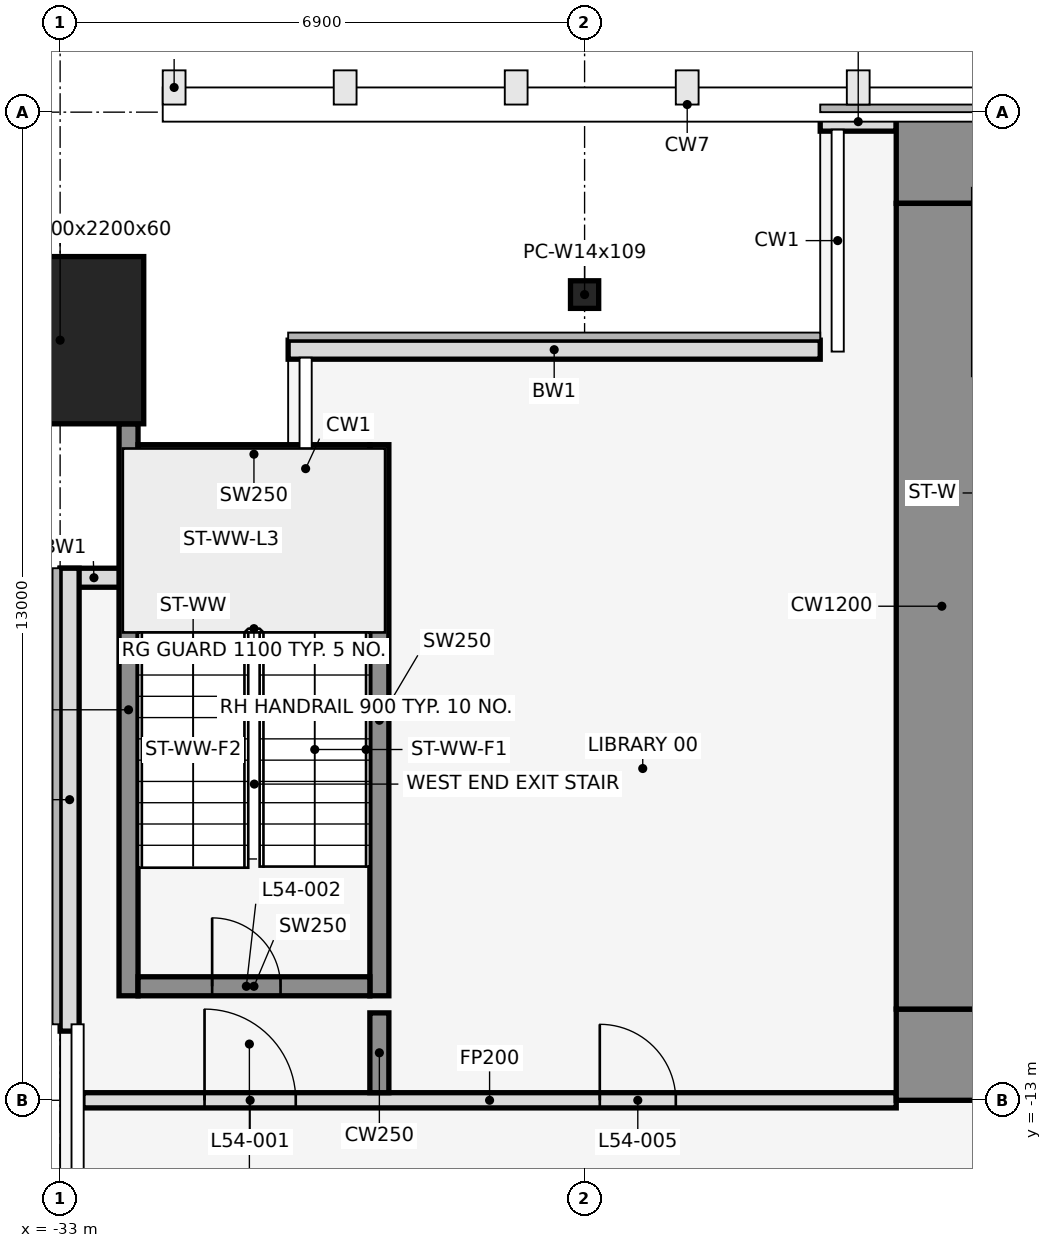
"""IFC4 building model, lengths in metres.
Left out: names, types, materials, properties, quantities, classifications, styles, units other than length and angle.
Written with IfcOpenShell. Run it as: python <this file> out.ifc"""

import sys

from ifc_helpers import new_model, si_unit, direction, frame, frame_2d, origin, origin_2d, place, context, subcontext, project, spatial, rectangle, hollow_rectangle, i_section, extrude, element, fill, save


model = new_model("IFC4")
c1 = context("Model", 3, precision=1e-05, world=origin(), true_north=direction((0.0, 1.0)))
c2 = subcontext(c1, "Body", "Model", "MODEL_VIEW")
j1 = project(units=[si_unit("LENGTHUNIT", "METRE"), si_unit("PLANEANGLEUNIT", "RADIAN")], contexts=[c1])
p1 = place(None, origin())
s1 = spatial("IfcSite", under=j1, at=p1, CompositionType="ELEMENT")
p2 = place(p1, origin())
s2 = spatial("IfcBuilding", under=s1, at=p2, CompositionType="ELEMENT")
p3 = place(p2, frame((0.0, 0.0, 241.4)))
s3 = spatial("IfcBuildingStorey", under=s2, at=p3, CompositionType="ELEMENT", Elevation=241.4)
p4 = place(p3, frame((-33.0, -3.0, 0.0), z_axis=(0.0, 0.0, 1.0), x_axis=(1.0, 0.0, 0.0)))
e1 = element("IfcColumn", 1, at=p4, inside=s3, PredefinedType="COLUMN", context=c2, shape_type="SweptSolid", body=[
    extrude(hollow_rectangle(XDim=2.2, YDim=2.2, WallThickness=0.06, at=origin_2d()), origin(), (0.0, 0.0, 1.0), 4.2),
])
p5 = place(p3, frame((-26.1, -2.4, 0.0), z_axis=(0.0, 0.0, 1.0), x_axis=(1.0, 0.0, 0.0)))
e2 = element("IfcColumn", 2, at=p5, inside=s3, PredefinedType="COLUMN", context=c2, shape_type="SweptSolid", body=[
    extrude(i_section(OverallWidth=0.371, OverallDepth=0.363, WebThickness=0.013, FlangeThickness=0.022, at=origin_2d()), origin(), (0.0, 0.0, 1.0), 4.2),
])
p6 = place(p3, frame((-22.0, -0.125, 0.0), z_axis=(0.0, 0.0, 1.0), x_axis=(-1.0, 0.0, 0.0)))
e3 = element("IfcWall", 3, at=p6, inside=s3, PredefinedType="STANDARD", context=c2, shape_type="SweptSolid", body=[
    extrude(rectangle(XDim=1.0, YDim=0.25, at=frame_2d((0.5, 0.0))), origin(), (0.0, 0.0, 1.0), 4.05),
])
p7 = place(p3, frame((-23.0, -3.125, 0.0), z_axis=(0.0, 0.0, 1.0), x_axis=(-1.0, 0.0, 0.0)))
e4 = element("IfcWall", 4, at=p7, inside=s3, PredefinedType="STANDARD", context=c2, shape_type="SweptSolid", body=[
    extrude(rectangle(XDim=7.0, YDim=0.25, at=frame_2d((3.5, 0.0))), origin(), (0.0, 0.0, 1.0), 4.05),
])
p8 = place(p3, frame((-32.11, -6.125, 0.0), z_axis=(0.0, 0.0, 1.0), x_axis=(-1.0, 0.0, 0.0)))
e5 = element("IfcWall", 5, at=p8, inside=s3, PredefinedType="STANDARD", context=c2, shape_type="SweptSolid", body=[
    extrude(rectangle(XDim=0.89, YDim=0.25, at=frame_2d((0.445, 0.0))), origin(), (0.0, 0.0, 1.0), 4.05),
])
p9 = place(p3, frame((-32.875, -6.0, 0.0), z_axis=(0.0, 0.0, 1.0), x_axis=(0.0, -1.0, 0.0)))
e6 = element("IfcWall", 6, at=p9, inside=s3, PredefinedType="STANDARD", context=c2, shape_type="SweptSolid", body=[
    extrude(rectangle(XDim=6.09, YDim=0.25, at=frame_2d((3.045, 0.0))), origin(), (0.0, 0.0, 1.0), 4.05),
])
p10 = place(p3, frame((-32.1, -11.625, 0.0), z_axis=(0.0, 0.0, 1.0), x_axis=(0.0, 1.0, 0.0)))
e7 = element("IfcWall", 7, at=p10, inside=s3, PredefinedType="SHEAR", context=c2, shape_type="SweptSolid", body=[
    extrude(rectangle(XDim=7.525, YDim=0.25, at=frame_2d((3.762, 0.0))), origin(), (0.0, 0.0, 1.0), 4.2),
])
p11 = place(p3, frame((-28.8, -11.625, 0.0), z_axis=(0.0, 0.0, 1.0), x_axis=(0.0, 1.0, 0.0)))
e8 = element("IfcWall", 8, at=p11, inside=s3, PredefinedType="SHEAR", context=c2, shape_type="SweptSolid", body=[
    extrude(rectangle(XDim=7.25, YDim=0.25, at=frame_2d((3.625, 0.0))), origin(), (0.0, 0.0, 1.0), 4.2),
])
p12 = place(p3, frame((-31.975, -11.5, 0.0), z_axis=(0.0, 0.0, 1.0), x_axis=(1.0, 0.0, 0.0)))
e9 = element("IfcWall", 9, at=p12, inside=s3, PredefinedType="SHEAR", context=c2, shape_type="SweptSolid", body=[
    extrude(rectangle(XDim=3.05, YDim=0.25, at=frame_2d((1.525, 0.0))), origin(), (0.0, 0.0, 1.0), 4.2),
])
p13 = place(p12, frame((0.975, 0.0, 0.0)))
e10 = element("IfcOpeningElement", 10, at=p13, cuts=e9, PredefinedType="OPENING", context=c2, shape_type="SweptSolid", body=[
    extrude(rectangle(XDim=0.9, YDim=2.1, at=frame_2d((0.45, 1.05))), frame((0.0, 0.137, 0.0), z_axis=(0.0, -1.0, 0.0), x_axis=(1.0, 0.0, 0.0)), (0.0, 0.0, 1.0), 0.274),
])
p14 = place(p3, frame((-31.975, -4.5, 0.0), z_axis=(0.0, 0.0, 1.0), x_axis=(1.0, 0.0, 0.0)))
e11 = element("IfcWall", 11, at=p14, inside=s3, PredefinedType="SHEAR", context=c2, shape_type="SweptSolid", body=[
    extrude(rectangle(XDim=3.05, YDim=0.25, at=frame_2d((1.525, 0.0))), origin(), (0.0, 0.0, 1.0), 4.2),
])
p15 = place(p3, frame((-32.7, -13.0, 0.0), z_axis=(0.0, 0.0, 1.0), x_axis=(1.0, 0.0, 0.0)))
e12 = element("IfcWall", 12, at=p15, inside=s3, PredefinedType="PARTITIONING", context=c2, shape_type="SweptSolid", body=[
    extrude(rectangle(XDim=10.7, YDim=0.2, at=frame_2d((5.35, 0.0))), origin(), (0.0, 0.0, 1.0), 3.118),
])
p16 = place(p15, frame((1.6, 0.0, 0.0)))
e13 = element("IfcOpeningElement", 13, at=p16, cuts=e12, PredefinedType="OPENING", context=c2, shape_type="SweptSolid", body=[
    extrude(rectangle(XDim=1.2, YDim=2.1, at=frame_2d((0.6, 1.05))), frame((0.0, 0.112, 0.0), z_axis=(0.0, -1.0, 0.0), x_axis=(1.0, 0.0, 0.0)), (0.0, 0.0, 1.0), 0.224),
])
p17 = place(p15, frame((6.8, 0.0, 0.0)))
e14 = element("IfcOpeningElement", 14, at=p17, cuts=e12, PredefinedType="OPENING", context=c2, shape_type="SweptSolid", body=[
    extrude(rectangle(XDim=1.0, YDim=2.1, at=frame_2d((0.5, 1.05))), frame((0.0, 0.112, 0.0), z_axis=(0.0, -1.0, 0.0), x_axis=(1.0, 0.0, 0.0)), (0.0, 0.0, 1.0), 0.224),
])
p18 = place(p3, frame((-28.8, -12.9, 0.0), z_axis=(0.0, 0.0, 1.0), x_axis=(0.0, 1.0, 0.0)))
e15 = element("IfcWall", 15, at=p18, inside=s3, PredefinedType="SHEAR", context=c2, shape_type="SweptSolid", body=[
    extrude(rectangle(XDim=1.05, YDim=0.25, at=frame_2d((0.525, 0.0))), origin(), (0.0, 0.0, 1.0), 4.2),
])
p19 = place(p3, frame((-22.0, -0.6, 0.0), z_axis=(0.0, 0.0, 1.0), x_axis=(1.0, 0.0, 0.0)))
e16 = element("IfcWall", 16, at=p19, inside=s3, PredefinedType="SHEAR", context=c2, shape_type="SweptSolid", body=[
    extrude(rectangle(XDim=44.0, YDim=1.2, at=frame_2d((22.0, 0.0))), origin(), (0.0, 0.0, 1.0), 4.2),
])
p20 = place(p19, frame((18.55, 0.0, 0.0)))
e17 = element("IfcOpeningElement", 17, at=p20, cuts=e16, PredefinedType="OPENING", context=c2, shape_type="SweptSolid", body=[
    extrude(rectangle(XDim=0.9, YDim=2.1, at=frame_2d((0.45, 1.05))), frame((0.0, 0.612, 0.0), z_axis=(0.0, -1.0, 0.0), x_axis=(1.0, 0.0, 0.0)), (0.0, 0.0, 1.0), 1.224),
])
p21 = place(p19, frame((24.55, 0.0, 0.0)))
e18 = element("IfcOpeningElement", 18, at=p21, cuts=e16, PredefinedType="OPENING", context=c2, shape_type="SweptSolid", body=[
    extrude(rectangle(XDim=0.9, YDim=2.1, at=frame_2d((0.45, 1.05))), frame((0.0, 0.612, 0.0), z_axis=(0.0, -1.0, 0.0), x_axis=(1.0, 0.0, 0.0)), (0.0, 0.0, 1.0), 1.224),
])
p22 = place(p3, frame((-22.0, -12.4, 0.0), z_axis=(0.0, 0.0, 1.0), x_axis=(1.0, 0.0, 0.0)))
e19 = element("IfcWall", 19, at=p22, inside=s3, PredefinedType="SHEAR", context=c2, shape_type="SweptSolid", body=[
    extrude(rectangle(XDim=44.0, YDim=1.2, at=frame_2d((22.0, 0.0))), origin(), (0.0, 0.0, 1.0), 4.2),
])
p23 = place(p22, frame((2.2, 0.0, 0.0)))
e20 = element("IfcOpeningElement", 20, at=p23, cuts=e19, PredefinedType="OPENING", context=c2, shape_type="SweptSolid", body=[
    extrude(rectangle(XDim=1.2, YDim=2.1, at=frame_2d((0.6, 1.05))), frame((0.0, 0.612, 0.0), z_axis=(0.0, -1.0, 0.0), x_axis=(1.0, 0.0, 0.0)), (0.0, 0.0, 1.0), 1.224),
])
p24 = place(p22, frame((21.4, 0.0, 0.0)))
e21 = element("IfcOpeningElement", 21, at=p24, cuts=e19, PredefinedType="OPENING", context=c2, shape_type="SweptSolid", body=[
    extrude(rectangle(XDim=1.2, YDim=2.1, at=frame_2d((0.6, 1.05))), frame((0.0, 0.612, 0.0), z_axis=(0.0, -1.0, 0.0), x_axis=(1.0, 0.0, 0.0)), (0.0, 0.0, 1.0), 1.224),
])
p25 = place(p22, frame((40.6, 0.0, 0.0)))
e22 = element("IfcOpeningElement", 22, at=p25, cuts=e19, PredefinedType="OPENING", context=c2, shape_type="SweptSolid", body=[
    extrude(rectangle(XDim=1.2, YDim=2.1, at=frame_2d((0.6, 1.05))), frame((0.0, 0.612, 0.0), z_axis=(0.0, -1.0, 0.0), x_axis=(1.0, 0.0, 0.0)), (0.0, 0.0, 1.0), 1.224),
])
p26 = place(p22, frame((16.0, 0.0, 0.0)))
e23 = element("IfcOpeningElement", 23, at=p26, cuts=e19, PredefinedType="OPENING", context=c2, shape_type="SweptSolid", body=[
    extrude(rectangle(XDim=1.8, YDim=2.1, at=frame_2d((0.9, 1.05))), frame((0.0, 0.612, 0.0), z_axis=(0.0, -1.0, 0.0), x_axis=(1.0, 0.0, 0.0)), (0.0, 0.0, 1.0), 1.224),
])
p27 = place(p22, frame((6.3, 0.0, 0.0)))
e24 = element("IfcOpeningElement", 24, at=p27, cuts=e19, PredefinedType="OPENING", context=c2, shape_type="SweptSolid", body=[
    extrude(rectangle(XDim=1.2, YDim=2.1, at=frame_2d((0.6, 1.05))), frame((0.0, 0.612, 0.0), z_axis=(0.0, -1.0, 0.0), x_axis=(1.0, 0.0, 0.0)), (0.0, 0.0, 1.0), 1.224),
])
p28 = place(p22, frame((26.2, 0.0, 0.0)))
e25 = element("IfcOpeningElement", 25, at=p28, cuts=e19, PredefinedType="OPENING", context=c2, shape_type="SweptSolid", body=[
    extrude(rectangle(XDim=1.8, YDim=2.1, at=frame_2d((0.9, 1.05))), frame((0.0, 0.612, 0.0), z_axis=(0.0, -1.0, 0.0), x_axis=(1.0, 0.0, 0.0)), (0.0, 0.0, 1.0), 1.224),
])
p29 = place(p22, frame((36.5, 0.0, 0.0)))
e26 = element("IfcOpeningElement", 26, at=p29, cuts=e19, PredefinedType="OPENING", context=c2, shape_type="SweptSolid", body=[
    extrude(rectangle(XDim=1.2, YDim=2.1, at=frame_2d((0.6, 1.05))), frame((0.0, 0.612, 0.0), z_axis=(0.0, -1.0, 0.0), x_axis=(1.0, 0.0, 0.0)), (0.0, 0.0, 1.0), 1.224),
])
p30 = place(p3, frame((-21.4, -11.8, 0.0), z_axis=(0.0, 0.0, 1.0), x_axis=(0.0, 1.0, 0.0)))
e27 = element("IfcWall", 27, at=p30, inside=s3, PredefinedType="SHEAR", context=c2, shape_type="SweptSolid", body=[
    extrude(rectangle(XDim=10.6, YDim=1.2, at=frame_2d((5.3, 0.0))), origin(), (0.0, 0.0, 1.0), 4.2),
])
p31 = place(p16, origin())
e28 = element("IfcDoor", 28, at=p31, inside=s3, OperationType="SINGLE_SWING_LEFT", PredefinedType="DOOR", context=c2, shape_type="SweptSolid", body=[
    extrude(rectangle(XDim=1.2, YDim=2.1, at=frame_2d((0.6, 1.05))), frame((0.0, 0.025, 0.0), z_axis=(0.0, -1.0, 0.0), x_axis=(1.0, 0.0, 0.0)), (0.0, 0.0, 1.0), 0.05),
])
fill(e13, e28)
p32 = place(p13, origin())
e29 = element("IfcDoor", 29, at=p32, inside=s3, OperationType="SINGLE_SWING_LEFT", PredefinedType="DOOR", context=c2, shape_type="SweptSolid", body=[
    extrude(rectangle(XDim=0.9, YDim=2.1, at=frame_2d((0.45, 1.05))), frame((0.0, 0.025, 0.0), z_axis=(0.0, -1.0, 0.0), x_axis=(1.0, 0.0, 0.0)), (0.0, 0.0, 1.0), 0.05),
])
fill(e10, e29)
p33 = place(p17, origin())
e30 = element("IfcDoor", 30, at=p33, inside=s3, OperationType="SINGLE_SWING_LEFT", PredefinedType="DOOR", context=c2, shape_type="SweptSolid", body=[
    extrude(rectangle(XDim=1.0, YDim=2.1, at=frame_2d((0.5, 1.05))), frame((0.0, 0.025, 0.0), z_axis=(0.0, -1.0, 0.0), x_axis=(1.0, 0.0, 0.0)), (0.0, 0.0, 1.0), 0.05),
])
fill(e14, e30)
save(model, sys.argv[1])
